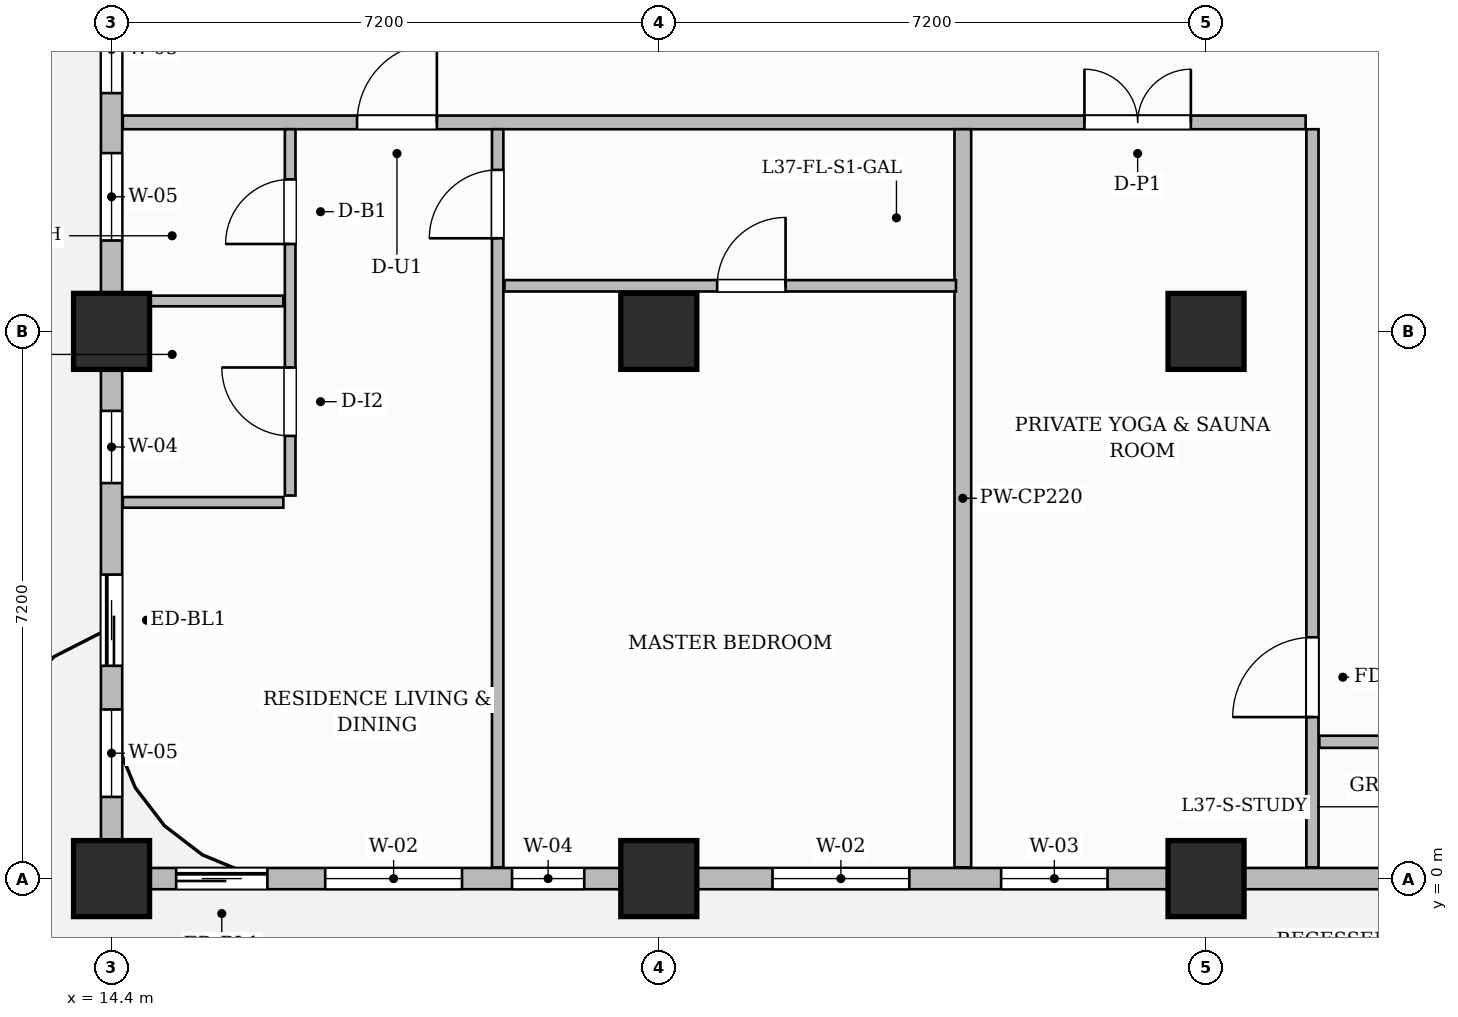
"""IFC4 building model, lengths in metres.
Left out: names, types, materials, properties, quantities, classifications, styles, units other than length and angle.
Written with IfcOpenShell. Run it as: python <this file> out.ifc"""

import sys

from ifc_helpers import new_model, si_unit, direction, frame, frame_2d, origin, origin_2d, place, context, subcontext, project, spatial, rectangle, extrude, source, transform, mapped, element, fill, save


model = new_model("IFC4")
c1 = context("Model", 3, precision=1e-05, world=origin(), true_north=direction((0.0, 1.0)))
c2 = subcontext(c1, "Body", "Model", "MODEL_VIEW")
j1 = project(units=[si_unit("LENGTHUNIT", "METRE"), si_unit("PLANEANGLEUNIT", "RADIAN")], contexts=[c1])
p1 = place(None, origin())
s1 = spatial("IfcSite", under=j1, at=p1, CompositionType="ELEMENT")
p2 = place(p1, origin())
s2 = spatial("IfcBuilding", under=s1, at=p2, CompositionType="ELEMENT")
p3 = place(p2, frame((0.0, 0.0, 150.3)))
s3 = spatial("IfcBuildingStorey", under=s2, at=p3, CompositionType="ELEMENT", Elevation=150.3)
m1 = source(origin(), c2, "Body", "SweptSolid", [
    extrude(rectangle(XDim=1.0, YDim=1.0, at=origin_2d()), origin(), (0.0, 0.0, 1.0), 3.85),
])
for number, where, z_axis, x_axis in (
    (1, (14.4, 0.0, 0.0), (0.0, 0.0, 1.0), (1.0, 0.0, 0.0)),
    (2, (14.4, 7.2, 0.0), (0.0, 0.0, 1.0), (1.0, 0.0, 0.0)),
    (3, (21.6, 0.0, 0.0), (0.0, 0.0, 1.0), (1.0, 0.0, 0.0)),
    (4, (21.6, 7.2, 0.0), (0.0, 0.0, 1.0), (1.0, 0.0, 0.0)),
    (5, (28.8, 0.0, 0.0), (0.0, 0.0, 1.0), (1.0, 0.0, 0.0)),
    (6, (28.8, 7.2, 0.0), (0.0, 0.0, 1.0), (1.0, 0.0, 0.0)),
):
    element("IfcColumn", number, at=place(p3, frame(where, z_axis=z_axis, x_axis=x_axis)), inside=s3, PredefinedType="COLUMN", context=c2, shape_type="MappedRepresentation", body=[
        mapped(m1, transform((0.0, 0.0, 0.0), scale=1.0)),
    ])
p4 = place(p3, frame((14.548, 9.95, 0.0), z_axis=(0.0, 0.0, 1.0), x_axis=(1.0, 0.0, 0.0)))
e7 = element("IfcWall", 7, at=p4, inside=s3, PredefinedType="PARTITIONING", context=c2, shape_type="SweptSolid", body=[
    extrude(rectangle(XDim=15.562, YDim=0.18, at=frame_2d((7.781, 0.0))), origin(), (0.0, 0.0, 1.0), 3.6),
])
p5 = place(p4, frame((3.082, 0.0, 0.0)))
e8 = element("IfcOpeningElement", 8, at=p5, cuts=e7, PredefinedType="OPENING", context=c2, shape_type="SweptSolid", body=[
    extrude(rectangle(XDim=1.05, YDim=2.25, at=frame_2d((0.525, 1.125))), frame((0.0, 0.1, 0.0), z_axis=(0.0, -1.0, 0.0), x_axis=(1.0, 0.0, 0.0)), (0.0, 0.0, 1.0), 0.2),
])
p6 = place(p4, frame((12.652, 0.0, 0.0)))
e9 = element("IfcOpeningElement", 9, at=p6, cuts=e7, PredefinedType="OPENING", context=c2, shape_type="SweptSolid", body=[
    extrude(rectangle(XDim=1.4, YDim=2.35, at=frame_2d((0.7, 1.175))), frame((0.0, 0.1, 0.0), z_axis=(0.0, -1.0, 0.0), x_axis=(1.0, 0.0, 0.0)), (0.0, 0.0, 1.0), 0.2),
])
p7 = place(p3, frame((30.2, 0.148, 0.0), z_axis=(0.0, 0.0, 1.0), x_axis=(0.0, 1.0, 0.0)))
e10 = element("IfcWall", 10, at=p7, inside=s3, PredefinedType="PARTITIONING", context=c2, shape_type="SweptSolid", body=[
    extrude(rectangle(XDim=9.712, YDim=0.16, at=frame_2d((4.856, 0.0))), origin(), (0.0, 0.0, 1.0), 3.6),
])
p8 = place(p7, frame((1.977, 0.0, 0.0)))
e11 = element("IfcOpeningElement", 11, at=p8, cuts=e10, PredefinedType="OPENING", context=c2, shape_type="SweptSolid", body=[
    extrude(rectangle(XDim=1.05, YDim=2.15, at=frame_2d((0.525, 1.075))), frame((0.0, 0.09, 0.0), z_axis=(0.0, -1.0, 0.0), x_axis=(1.0, 0.0, 0.0)), (0.0, 0.0, 1.0), 0.18),
])
p9 = place(p3, frame((30.29, 1.8, 0.0), z_axis=(0.0, 0.0, 1.0), x_axis=(1.0, 0.0, 0.0)))
e12 = element("IfcWall", 12, at=p9, inside=s3, PredefinedType="PARTITIONING", context=c2, shape_type="SweptSolid", body=[
    extrude(rectangle(XDim=19.37, YDim=0.16, at=frame_2d((9.685, 0.0))), origin(), (0.0, 0.0, 1.0), 3.6),
])
p10 = place(p9, frame((5.074, 0.0, 0.0)))
e13 = element("IfcOpeningElement", 13, at=p10, cuts=e12, PredefinedType="OPENING", context=c2, shape_type="SweptSolid", body=[
    extrude(rectangle(XDim=0.9, YDim=2.15, at=frame_2d((0.45, 1.075))), frame((0.0, 0.09, 0.0), z_axis=(0.0, -1.0, 0.0), x_axis=(1.0, 0.0, 0.0)), (0.0, 0.0, 1.0), 0.18),
])
p11 = place(p9, frame((14.06, 0.0, 0.0)))
e14 = element("IfcOpeningElement", 14, at=p11, cuts=e12, PredefinedType="OPENING", context=c2, shape_type="SweptSolid", body=[
    extrude(rectangle(XDim=0.9, YDim=2.15, at=frame_2d((0.45, 1.075))), frame((0.0, 0.09, 0.0), z_axis=(0.0, -1.0, 0.0), x_axis=(1.0, 0.0, 0.0)), (0.0, 0.0, 1.0), 0.18),
])
p12 = place(p3, frame((25.6, 0.148, 0.0), z_axis=(0.0, 0.0, 1.0), x_axis=(0.0, 1.0, 0.0)))
e15 = element("IfcWall", 15, at=p12, inside=s3, PredefinedType="PARTITIONING", context=c2, shape_type="SweptSolid", body=[
    extrude(rectangle(XDim=9.712, YDim=0.22, at=frame_2d((4.856, 0.0))), origin(), (0.0, 0.0, 1.0), 3.6),
])
p13 = place(p3, frame((16.75, 5.04, 0.0), z_axis=(0.0, 0.0, 1.0), x_axis=(0.0, 1.0, 0.0)))
e16 = element("IfcWall", 16, at=p13, inside=s3, PredefinedType="PARTITIONING", context=c2, shape_type="SweptSolid", body=[
    extrude(rectangle(XDim=4.82, YDim=0.14, at=frame_2d((2.41, 0.0))), origin(), (0.0, 0.0, 1.0), 3.6),
])
p14 = place(p13, frame((0.785, 0.0, 0.0)))
e17 = element("IfcOpeningElement", 17, at=p14, cuts=e16, PredefinedType="OPENING", context=c2, shape_type="SweptSolid", body=[
    extrude(rectangle(XDim=0.9, YDim=2.15, at=frame_2d((0.45, 1.075))), frame((0.0, 0.08, 0.0), z_axis=(0.0, -1.0, 0.0), x_axis=(1.0, 0.0, 0.0)), (0.0, 0.0, 1.0), 0.16),
])
p15 = place(p13, frame((3.31, 0.0, 0.0)))
e18 = element("IfcOpeningElement", 18, at=p15, cuts=e16, PredefinedType="OPENING", context=c2, shape_type="SweptSolid", body=[
    extrude(rectangle(XDim=0.85, YDim=2.1, at=frame_2d((0.425, 1.05))), frame((0.0, 0.08, 0.0), z_axis=(0.0, -1.0, 0.0), x_axis=(1.0, 0.0, 0.0)), (0.0, 0.0, 1.0), 0.16),
])
p16 = place(p3, frame((14.59, 7.6, 0.0), z_axis=(0.0, 0.0, 1.0), x_axis=(1.0, 0.0, 0.0)))
e19 = element("IfcWall", 19, at=p16, inside=s3, PredefinedType="PARTITIONING", context=c2, shape_type="SweptSolid", body=[
    extrude(rectangle(XDim=2.07, YDim=0.14, at=frame_2d((1.035, 0.0))), origin(), (0.0, 0.0, 1.0), 3.6),
])
p17 = place(p3, frame((14.548, 4.95, 0.0), z_axis=(0.0, 0.0, 1.0), x_axis=(1.0, 0.0, 0.0)))
e20 = element("IfcWall", 20, at=p17, inside=s3, PredefinedType="PARTITIONING", context=c2, shape_type="SweptSolid", body=[
    extrude(rectangle(XDim=2.112, YDim=0.14, at=frame_2d((1.056, 0.0))), origin(), (0.0, 0.0, 1.0), 3.6),
])
p18 = place(p3, frame((19.48, 0.148, 0.0), z_axis=(0.0, 0.0, 1.0), x_axis=(0.0, 1.0, 0.0)))
e21 = element("IfcWall", 21, at=p18, inside=s3, PredefinedType="PARTITIONING", context=c2, shape_type="SweptSolid", body=[
    extrude(rectangle(XDim=9.712, YDim=0.15, at=frame_2d((4.856, 0.0))), origin(), (0.0, 0.0, 1.0), 3.6),
])
p19 = place(p18, frame((8.277, 0.0, 0.0)))
e22 = element("IfcOpeningElement", 22, at=p19, cuts=e21, PredefinedType="OPENING", context=c2, shape_type="SweptSolid", body=[
    extrude(rectangle(XDim=0.9, YDim=2.15, at=frame_2d((0.45, 1.075))), frame((0.0, 0.085, 0.0), z_axis=(0.0, -1.0, 0.0), x_axis=(1.0, 0.0, 0.0)), (0.0, 0.0, 1.0), 0.17),
])
p20 = place(p3, frame((19.57, 7.8, 0.0), z_axis=(0.0, 0.0, 1.0), x_axis=(1.0, 0.0, 0.0)))
e23 = element("IfcWall", 23, at=p20, inside=s3, PredefinedType="PARTITIONING", context=c2, shape_type="SweptSolid", body=[
    extrude(rectangle(XDim=5.94, YDim=0.15, at=frame_2d((2.97, 0.0))), origin(), (0.0, 0.0, 1.0), 3.6),
])
p21 = place(p20, frame((2.798, 0.0, 0.0)))
e24 = element("IfcOpeningElement", 24, at=p21, cuts=e23, PredefinedType="OPENING", context=c2, shape_type="SweptSolid", body=[
    extrude(rectangle(XDim=0.9, YDim=2.15, at=frame_2d((0.45, 1.075))), frame((0.0, 0.085, 0.0), z_axis=(0.0, -1.0, 0.0), x_axis=(1.0, 0.0, 0.0)), (0.0, 0.0, 1.0), 0.17),
])
p22 = place(p3, frame((14.4, 0.0, 0.0), z_axis=(0.0, 0.0, 1.0), x_axis=(1.0, 0.0, 0.0)))
e25 = element("IfcWall", 25, at=p22, inside=s3, PredefinedType="SOLIDWALL", context=c2, shape_type="SweptSolid", body=[
    extrude(rectangle(XDim=35.4, YDim=0.28, at=frame_2d((17.7, 0.0))), origin(), (0.0, 0.0, 1.0), 3.085),
])
p23 = place(p22, frame((0.85, 0.0, 0.0)))
e26 = element("IfcOpeningElement", 26, at=p23, cuts=e25, PredefinedType="OPENING", context=c2, shape_type="SweptSolid", body=[
    extrude(rectangle(XDim=1.2, YDim=2.2, at=frame_2d((0.6, 1.1))), frame((0.0, 0.15, 0.0), z_axis=(0.0, -1.0, 0.0), x_axis=(1.0, 0.0, 0.0)), (0.0, 0.0, 1.0), 0.3),
])
p24 = place(p22, frame((2.811, 0.0, 0.8)))
e27 = element("IfcOpeningElement", 27, at=p24, cuts=e25, PredefinedType="OPENING", context=c2, shape_type="SweptSolid", body=[
    extrude(rectangle(XDim=1.8, YDim=1.85, at=frame_2d((0.9, 0.925))), frame((0.0, 0.15, 0.0), z_axis=(0.0, -1.0, 0.0), x_axis=(1.0, 0.0, 0.0)), (0.0, 0.0, 1.0), 0.3),
])
p25 = place(p22, frame((5.269, 0.0, 0.8)))
e28 = element("IfcOpeningElement", 28, at=p25, cuts=e25, PredefinedType="OPENING", context=c2, shape_type="SweptSolid", body=[
    extrude(rectangle(XDim=0.95, YDim=1.75, at=frame_2d((0.475, 0.875))), frame((0.0, 0.15, 0.0), z_axis=(0.0, -1.0, 0.0), x_axis=(1.0, 0.0, 0.0)), (0.0, 0.0, 1.0), 0.3),
])
p26 = place(p22, frame((8.696, 0.0, 0.8)))
e29 = element("IfcOpeningElement", 29, at=p26, cuts=e25, PredefinedType="OPENING", context=c2, shape_type="SweptSolid", body=[
    extrude(rectangle(XDim=1.8, YDim=1.85, at=frame_2d((0.9, 0.925))), frame((0.0, 0.15, 0.0), z_axis=(0.0, -1.0, 0.0), x_axis=(1.0, 0.0, 0.0)), (0.0, 0.0, 1.0), 0.3),
])
p27 = place(p22, frame((11.704, 0.0, 0.8)))
e30 = element("IfcOpeningElement", 30, at=p27, cuts=e25, PredefinedType="OPENING", context=c2, shape_type="SweptSolid", body=[
    extrude(rectangle(XDim=1.4, YDim=1.85, at=frame_2d((0.7, 0.925))), frame((0.0, 0.15, 0.0), z_axis=(0.0, -1.0, 0.0), x_axis=(1.0, 0.0, 0.0)), (0.0, 0.0, 1.0), 0.3),
])
p28 = place(p22, frame((16.804, 0.0, 0.8)))
e31 = element("IfcOpeningElement", 31, at=p28, cuts=e25, PredefinedType="OPENING", context=c2, shape_type="SweptSolid", body=[
    extrude(rectangle(XDim=1.8, YDim=1.85, at=frame_2d((0.9, 0.925))), frame((0.0, 0.15, 0.0), z_axis=(0.0, -1.0, 0.0), x_axis=(1.0, 0.0, 0.0)), (0.0, 0.0, 1.0), 0.3),
])
p29 = place(p22, frame((22.396, 0.0, 0.8)))
e32 = element("IfcOpeningElement", 32, at=p29, cuts=e25, PredefinedType="OPENING", context=c2, shape_type="SweptSolid", body=[
    extrude(rectangle(XDim=1.8, YDim=1.85, at=frame_2d((0.9, 0.925))), frame((0.0, 0.15, 0.0), z_axis=(0.0, -1.0, 0.0), x_axis=(1.0, 0.0, 0.0)), (0.0, 0.0, 1.0), 0.3),
])
p30 = place(p22, frame((25.629, 0.0, 0.8)))
e33 = element("IfcOpeningElement", 33, at=p30, cuts=e25, PredefinedType="OPENING", context=c2, shape_type="SweptSolid", body=[
    extrude(rectangle(XDim=0.95, YDim=1.75, at=frame_2d((0.475, 0.875))), frame((0.0, 0.15, 0.0), z_axis=(0.0, -1.0, 0.0), x_axis=(1.0, 0.0, 0.0)), (0.0, 0.0, 1.0), 0.3),
])
p31 = place(p22, frame((29.075, 0.0, 0.8)))
e34 = element("IfcOpeningElement", 34, at=p31, cuts=e25, PredefinedType="OPENING", context=c2, shape_type="SweptSolid", body=[
    extrude(rectangle(XDim=1.8, YDim=1.85, at=frame_2d((0.9, 0.925))), frame((0.0, 0.15, 0.0), z_axis=(0.0, -1.0, 0.0), x_axis=(1.0, 0.0, 0.0)), (0.0, 0.0, 1.0), 0.3),
])
p32 = place(p22, frame((32.125, 0.0, 0.8)))
e35 = element("IfcOpeningElement", 35, at=p32, cuts=e25, PredefinedType="OPENING", context=c2, shape_type="SweptSolid", body=[
    extrude(rectangle(XDim=1.8, YDim=1.85, at=frame_2d((0.9, 0.925))), frame((0.0, 0.15, 0.0), z_axis=(0.0, -1.0, 0.0), x_axis=(1.0, 0.0, 0.0)), (0.0, 0.0, 1.0), 0.3),
])
p33 = place(p3, frame((14.4, 0.05, 0.0), z_axis=(0.0, 0.0, 1.0), x_axis=(0.0, 1.0, 0.0)))
e36 = element("IfcWall", 36, at=p33, inside=s3, PredefinedType="SOLIDWALL", context=c2, shape_type="SweptSolid", body=[
    extrude(rectangle(XDim=20.6, YDim=0.28, at=frame_2d((10.3, 0.0))), origin(), (0.0, 0.0, 1.0), 3.085),
])
p34 = place(p33, frame((2.75, 0.0, 0.0)))
e37 = element("IfcOpeningElement", 37, at=p34, cuts=e36, PredefinedType="OPENING", context=c2, shape_type="SweptSolid", body=[
    extrude(rectangle(XDim=1.2, YDim=2.2, at=frame_2d((0.6, 1.1))), frame((0.0, 0.15, 0.0), z_axis=(0.0, -1.0, 0.0), x_axis=(1.0, 0.0, 0.0)), (0.0, 0.0, 1.0), 0.3),
])
p35 = place(p33, frame((1.025, 0.0, 0.8)))
e38 = element("IfcOpeningElement", 38, at=p35, cuts=e36, PredefinedType="OPENING", context=c2, shape_type="SweptSolid", body=[
    extrude(rectangle(XDim=1.15, YDim=1.8, at=frame_2d((0.575, 0.9))), frame((0.0, 0.15, 0.0), z_axis=(0.0, -1.0, 0.0), x_axis=(1.0, 0.0, 0.0)), (0.0, 0.0, 1.0), 0.3),
])
p36 = place(p33, frame((5.154, 0.0, 0.8)))
e39 = element("IfcOpeningElement", 39, at=p36, cuts=e36, PredefinedType="OPENING", context=c2, shape_type="SweptSolid", body=[
    extrude(rectangle(XDim=0.95, YDim=1.75, at=frame_2d((0.475, 0.875))), frame((0.0, 0.15, 0.0), z_axis=(0.0, -1.0, 0.0), x_axis=(1.0, 0.0, 0.0)), (0.0, 0.0, 1.0), 0.3),
])
p37 = place(p33, frame((8.346, 0.0, 0.8)))
e40 = element("IfcOpeningElement", 40, at=p37, cuts=e36, PredefinedType="OPENING", context=c2, shape_type="SweptSolid", body=[
    extrude(rectangle(XDim=1.15, YDim=1.8, at=frame_2d((0.575, 0.9))), frame((0.0, 0.15, 0.0), z_axis=(0.0, -1.0, 0.0), x_axis=(1.0, 0.0, 0.0)), (0.0, 0.0, 1.0), 0.3),
])
p38 = place(p33, frame((10.285, 0.0, 0.8)))
e41 = element("IfcOpeningElement", 41, at=p38, cuts=e36, PredefinedType="OPENING", context=c2, shape_type="SweptSolid", body=[
    extrude(rectangle(XDim=1.15, YDim=1.8, at=frame_2d((0.575, 0.9))), frame((0.0, 0.15, 0.0), z_axis=(0.0, -1.0, 0.0), x_axis=(1.0, 0.0, 0.0)), (0.0, 0.0, 1.0), 0.3),
])
p39 = place(p33, frame((12.114, 0.0, 0.8)))
e42 = element("IfcOpeningElement", 42, at=p39, cuts=e36, PredefinedType="OPENING", context=c2, shape_type="SweptSolid", body=[
    extrude(rectangle(XDim=1.15, YDim=1.8, at=frame_2d((0.575, 0.9))), frame((0.0, 0.15, 0.0), z_axis=(0.0, -1.0, 0.0), x_axis=(1.0, 0.0, 0.0)), (0.0, 0.0, 1.0), 0.3),
])
p40 = place(p33, frame((16.79, 0.0, 0.8)))
e43 = element("IfcOpeningElement", 43, at=p40, cuts=e36, PredefinedType="OPENING", context=c2, shape_type="SweptSolid", body=[
    extrude(rectangle(XDim=1.8, YDim=1.85, at=frame_2d((0.9, 0.925))), frame((0.0, 0.15, 0.0), z_axis=(0.0, -1.0, 0.0), x_axis=(1.0, 0.0, 0.0)), (0.0, 0.0, 1.0), 0.3),
])
m2 = source(origin(), c2, "Body", "SweptSolid", [
    extrude(rectangle(XDim=1.05, YDim=2.15, at=frame_2d((0.525, 1.075))), frame((0.0, 0.025, 0.0), z_axis=(0.0, -1.0, 0.0), x_axis=(1.0, 0.0, 0.0)), (0.0, 0.0, 1.0), 0.05),
])
p41 = place(p8, origin())
e44 = element("IfcDoor", 44, at=p41, inside=s3, OperationType="SINGLE_SWING_LEFT", PredefinedType="DOOR", context=c2, shape_type="MappedRepresentation", body=[
    mapped(m2, transform((0.0, 0.0, 0.0), scale=1.0)),
])
fill(e11, e44)
m3 = source(origin(), c2, "Body", "SweptSolid", [
    extrude(rectangle(XDim=0.9, YDim=2.15, at=frame_2d((0.45, 1.075))), frame((0.0, 0.025, 0.0), z_axis=(0.0, -1.0, 0.0), x_axis=(1.0, 0.0, 0.0)), (0.0, 0.0, 1.0), 0.05),
])
p42 = place(p14, origin())
e45 = element("IfcDoor", 45, at=p42, inside=s3, OperationType="SINGLE_SWING_RIGHT", PredefinedType="DOOR", context=c2, shape_type="MappedRepresentation", body=[
    mapped(m3, transform((0.0, 0.0, 0.0), scale=1.0)),
])
fill(e17, e45)
m4 = source(origin(), c2, "Body", "SweptSolid", [
    extrude(rectangle(XDim=0.85, YDim=2.1, at=frame_2d((0.425, 1.05))), frame((0.0, 0.025, 0.0), z_axis=(0.0, -1.0, 0.0), x_axis=(1.0, 0.0, 0.0)), (0.0, 0.0, 1.0), 0.05),
])
p43 = place(p15, origin())
e46 = element("IfcDoor", 46, at=p43, inside=s3, OperationType="SINGLE_SWING_LEFT", PredefinedType="DOOR", context=c2, shape_type="MappedRepresentation", body=[
    mapped(m4, transform((0.0, 0.0, 0.0), scale=1.0)),
])
fill(e18, e46)
m5 = source(origin(), c2, "Body", "SweptSolid", [
    extrude(rectangle(XDim=1.05, YDim=2.25, at=frame_2d((0.525, 1.125))), frame((0.0, 0.025, 0.0), z_axis=(0.0, -1.0, 0.0), x_axis=(1.0, 0.0, 0.0)), (0.0, 0.0, 1.0), 0.05),
])
p44 = place(p5, origin())
e47 = element("IfcDoor", 47, at=p44, inside=s3, OperationType="SINGLE_SWING_RIGHT", PredefinedType="DOOR", context=c2, shape_type="MappedRepresentation", body=[
    mapped(m5, transform((0.0, 0.0, 0.0), scale=1.0)),
])
fill(e8, e47)
p45 = place(p19, origin())
e48 = element("IfcDoor", 48, at=p45, inside=s3, OperationType="SINGLE_SWING_LEFT", PredefinedType="DOOR", context=c2, shape_type="MappedRepresentation", body=[
    mapped(m3, transform((0.0, 0.0, 0.0), scale=1.0)),
])
fill(e22, e48)
p46 = place(p21, origin())
e49 = element("IfcDoor", 49, at=p46, inside=s3, OperationType="SINGLE_SWING_RIGHT", PredefinedType="DOOR", context=c2, shape_type="MappedRepresentation", body=[
    mapped(m3, transform((0.0, 0.0, 0.0), scale=1.0)),
])
fill(e24, e49)
m6 = source(origin(), c2, "Body", "SweptSolid", [
    extrude(rectangle(XDim=1.4, YDim=2.35, at=frame_2d((0.7, 1.175))), frame((0.0, 0.025, 0.0), z_axis=(0.0, -1.0, 0.0), x_axis=(1.0, 0.0, 0.0)), (0.0, 0.0, 1.0), 0.05),
])
p47 = place(p6, origin())
e50 = element("IfcDoor", 50, at=p47, inside=s3, OperationType="DOUBLE_DOOR_SINGLE_SWING", PredefinedType="DOOR", context=c2, shape_type="MappedRepresentation", body=[
    mapped(m6, transform((0.0, 0.0, 0.0), scale=1.0)),
])
fill(e9, e50)
m7 = source(origin(), c2, "Body", "SweptSolid", [
    extrude(rectangle(XDim=1.2, YDim=2.2, at=frame_2d((0.6, 1.1))), frame((0.0, 0.025, 0.0), z_axis=(0.0, -1.0, 0.0), x_axis=(1.0, 0.0, 0.0)), (0.0, 0.0, 1.0), 0.05),
])
p48 = place(p23, origin())
e51 = element("IfcDoor", 51, at=p48, inside=s3, OperationType="SLIDING_TO_LEFT", PredefinedType="DOOR", context=c2, shape_type="MappedRepresentation", body=[
    mapped(m7, transform((0.0, 0.0, 0.0), scale=1.0)),
])
fill(e26, e51)
p49 = place(p34, origin())
e52 = element("IfcDoor", 52, at=p49, inside=s3, OperationType="SLIDING_TO_LEFT", PredefinedType="DOOR", context=c2, shape_type="MappedRepresentation", body=[
    mapped(m7, transform((0.0, 0.0, 0.0), scale=1.0)),
])
fill(e37, e52)
m8 = source(origin(), c2, "Body", "SweptSolid", [
    extrude(rectangle(XDim=1.8, YDim=1.85, at=frame_2d((0.9, 0.925))), frame((0.0, 0.03, 0.0), z_axis=(0.0, -1.0, 0.0), x_axis=(1.0, 0.0, 0.0)), (0.0, 0.0, 1.0), 0.06),
])
p50 = place(p24, origin())
e53 = element("IfcWindow", 53, at=p50, inside=s3, PartitioningType="DOUBLE_PANEL_VERTICAL", PredefinedType="WINDOW", context=c2, shape_type="MappedRepresentation", body=[
    mapped(m8, transform((0.0, 0.0, 0.0), scale=1.0)),
])
fill(e27, e53)
m9 = source(origin(), c2, "Body", "SweptSolid", [
    extrude(rectangle(XDim=0.95, YDim=1.75, at=frame_2d((0.475, 0.875))), frame((0.0, 0.03, 0.0), z_axis=(0.0, -1.0, 0.0), x_axis=(1.0, 0.0, 0.0)), (0.0, 0.0, 1.0), 0.06),
])
p51 = place(p25, origin())
e54 = element("IfcWindow", 54, at=p51, inside=s3, PartitioningType="SINGLE_PANEL", PredefinedType="WINDOW", context=c2, shape_type="MappedRepresentation", body=[
    mapped(m9, transform((0.0, 0.0, 0.0), scale=1.0)),
])
fill(e28, e54)
p52 = place(p26, origin())
e55 = element("IfcWindow", 55, at=p52, inside=s3, PartitioningType="DOUBLE_PANEL_VERTICAL", PredefinedType="WINDOW", context=c2, shape_type="MappedRepresentation", body=[
    mapped(m8, transform((0.0, 0.0, 0.0), scale=1.0)),
])
fill(e29, e55)
m10 = source(origin(), c2, "Body", "SweptSolid", [
    extrude(rectangle(XDim=1.4, YDim=1.85, at=frame_2d((0.7, 0.925))), frame((0.0, 0.03, 0.0), z_axis=(0.0, -1.0, 0.0), x_axis=(1.0, 0.0, 0.0)), (0.0, 0.0, 1.0), 0.06),
])
p53 = place(p27, origin())
e56 = element("IfcWindow", 56, at=p53, inside=s3, PartitioningType="SINGLE_PANEL", PredefinedType="WINDOW", context=c2, shape_type="MappedRepresentation", body=[
    mapped(m10, transform((0.0, 0.0, 0.0), scale=1.0)),
])
fill(e30, e56)
m11 = source(origin(), c2, "Body", "SweptSolid", [
    extrude(rectangle(XDim=1.15, YDim=1.8, at=frame_2d((0.575, 0.9))), frame((0.0, 0.03, 0.0), z_axis=(0.0, -1.0, 0.0), x_axis=(1.0, 0.0, 0.0)), (0.0, 0.0, 1.0), 0.06),
])
p54 = place(p35, origin())
e57 = element("IfcWindow", 57, at=p54, inside=s3, PartitioningType="SINGLE_PANEL", PredefinedType="WINDOW", context=c2, shape_type="MappedRepresentation", body=[
    mapped(m11, transform((0.0, 0.0, 0.0), scale=1.0)),
])
fill(e38, e57)
p55 = place(p36, origin())
e58 = element("IfcWindow", 58, at=p55, inside=s3, PartitioningType="SINGLE_PANEL", PredefinedType="WINDOW", context=c2, shape_type="MappedRepresentation", body=[
    mapped(m9, transform((0.0, 0.0, 0.0), scale=1.0)),
])
fill(e39, e58)
p56 = place(p37, origin())
e59 = element("IfcWindow", 59, at=p56, inside=s3, PartitioningType="SINGLE_PANEL", PredefinedType="WINDOW", context=c2, shape_type="MappedRepresentation", body=[
    mapped(m11, transform((0.0, 0.0, 0.0), scale=1.0)),
])
fill(e40, e59)
p57 = place(p38, origin())
e60 = element("IfcWindow", 60, at=p57, inside=s3, PartitioningType="SINGLE_PANEL", PredefinedType="WINDOW", context=c2, shape_type="MappedRepresentation", body=[
    mapped(m11, transform((0.0, 0.0, 0.0), scale=1.0)),
])
fill(e41, e60)
save(model, sys.argv[1])
